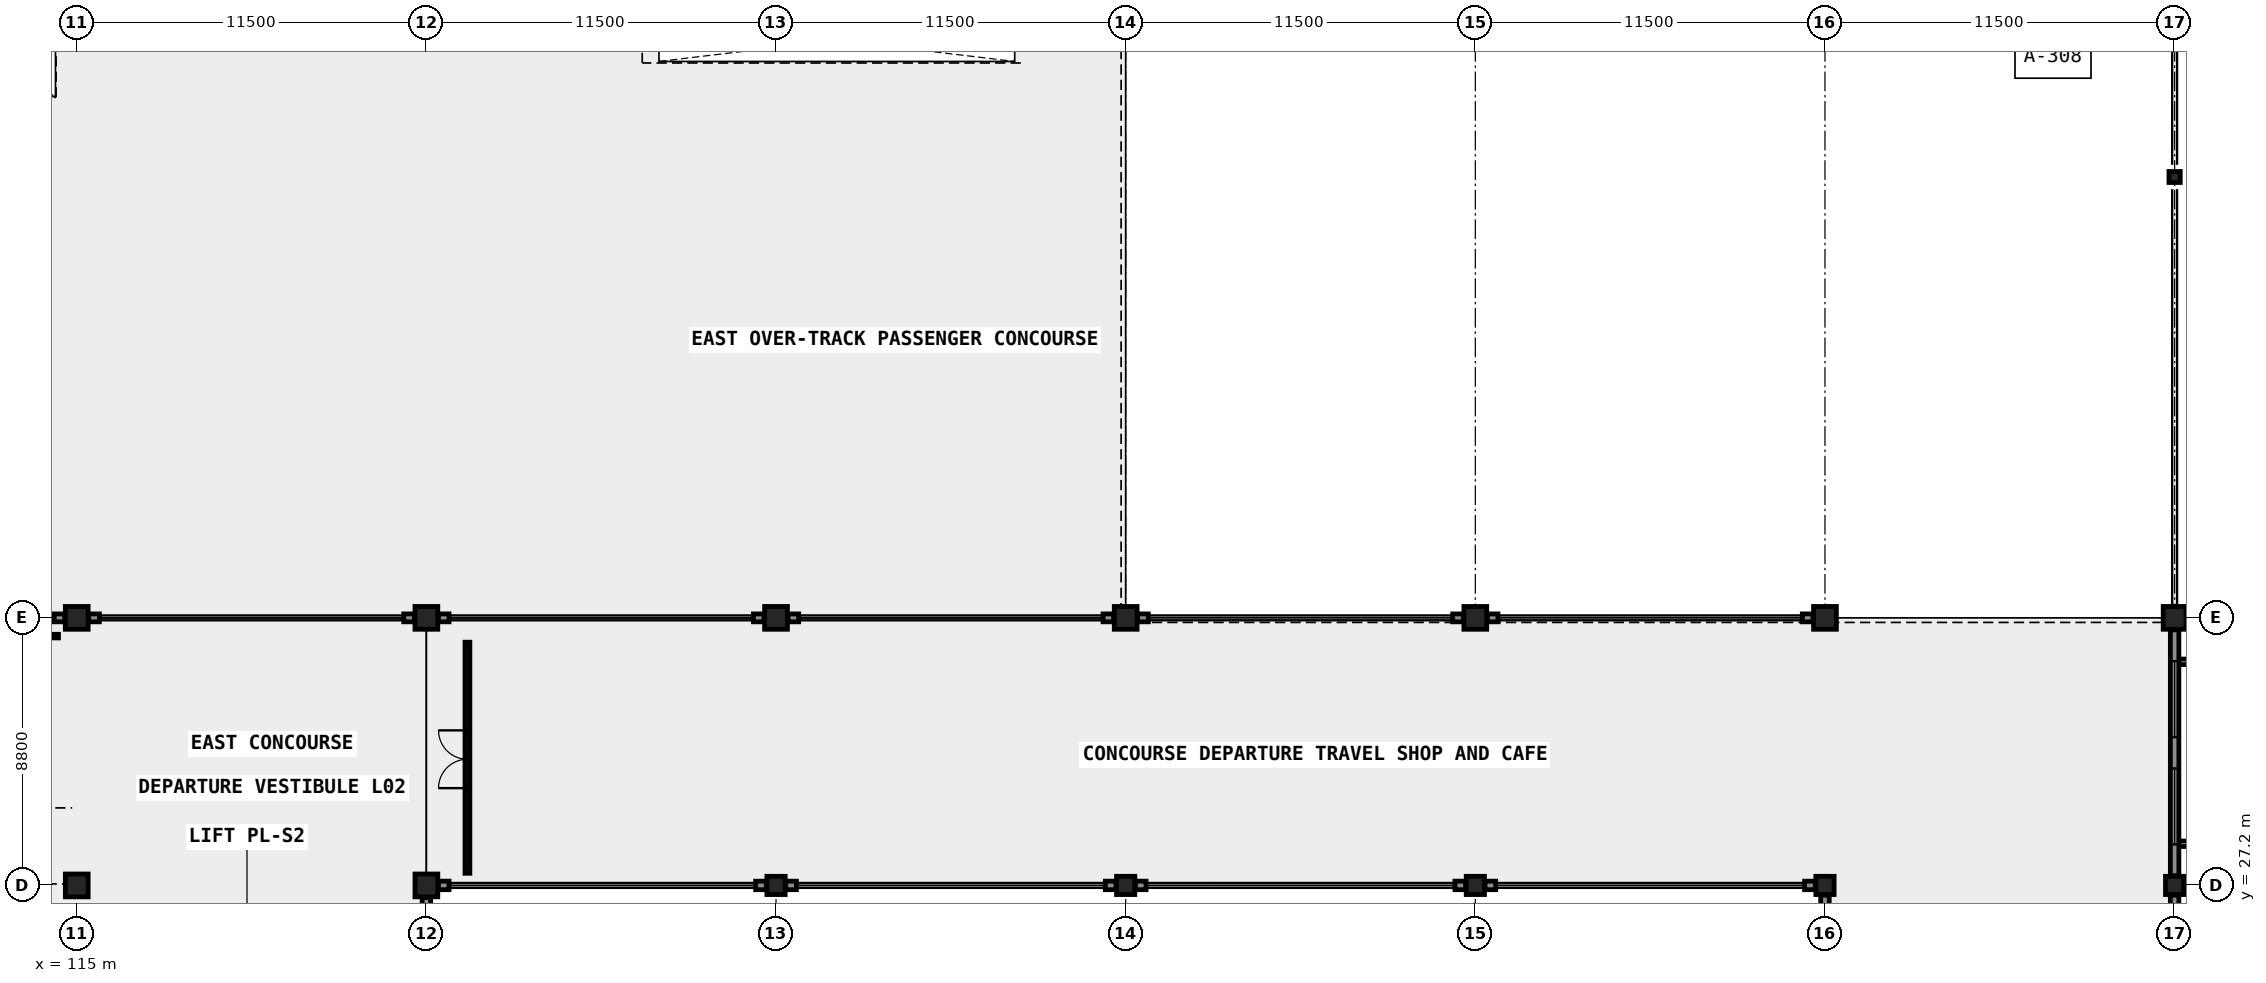
"""IFC4 building model, lengths in metres.
Left out: names, types, materials, properties, quantities, classifications, styles, units other than length and angle.
Written with IfcOpenShell. Run it as: python <this file> out.ifc"""

import sys

from ifc_helpers import new_model, si_unit, direction, frame, frame_2d, origin, origin_2d, place, context, subcontext, project, spatial, rectangle, circle, i_section, extrude, element, fill, save


model = new_model("IFC4")
c1 = context("Model", 3, precision=1e-05, world=origin(), true_north=direction((0.0, 1.0)))
c2 = subcontext(c1, "Body", "Model", "MODEL_VIEW")
j1 = project(units=[si_unit("LENGTHUNIT", "METRE"), si_unit("PLANEANGLEUNIT", "RADIAN")], contexts=[c1])
p1 = place(None, origin())
s1 = spatial("IfcSite", under=j1, at=p1, CompositionType="ELEMENT")
p2 = place(p1, origin())
s2 = spatial("IfcBuilding", under=s1, at=p2, CompositionType="ELEMENT")
p3 = place(p2, frame((0.0, 0.0, 8.4)))
s3 = spatial("IfcBuildingStorey", under=s2, at=p3, CompositionType="ELEMENT", Elevation=8.4)
p4 = place(p3, frame((115.0, 27.2, 0.0), z_axis=(0.0, 0.0, 1.0), x_axis=(1.0, 0.0, 0.0)))
e1 = element("IfcColumn", 1, at=p4, inside=s3, PredefinedType="COLUMN", context=c2, shape_type="SweptSolid", body=[
    extrude(circle(Radius=0.375, at=origin_2d()), origin(), (0.0, 0.0, 1.0), 5.4),
])
p5 = place(p3, frame((115.0, 36.0, 0.0), z_axis=(0.0, 0.0, 1.0), x_axis=(1.0, 0.0, 0.0)))
e2 = element("IfcColumn", 2, at=p5, inside=s3, PredefinedType="COLUMN", context=c2, shape_type="SweptSolid", body=[
    extrude(rectangle(XDim=0.75, YDim=0.75, at=origin_2d()), origin(), (0.0, 0.0, 1.0), 5.4),
])
p6 = place(p3, frame((126.5, 27.2, 0.0), z_axis=(0.0, 0.0, 1.0), x_axis=(1.0, 0.0, 0.0)))
e3 = element("IfcColumn", 3, at=p6, inside=s3, PredefinedType="COLUMN", context=c2, shape_type="SweptSolid", body=[
    extrude(circle(Radius=0.375, at=origin_2d()), origin(), (0.0, 0.0, 1.0), 5.4),
])
p7 = place(p3, frame((126.5, 36.0, 0.0), z_axis=(0.0, 0.0, 1.0), x_axis=(1.0, 0.0, 0.0)))
e4 = element("IfcColumn", 4, at=p7, inside=s3, PredefinedType="COLUMN", context=c2, shape_type="SweptSolid", body=[
    extrude(rectangle(XDim=0.75, YDim=0.75, at=origin_2d()), origin(), (0.0, 0.0, 1.0), 5.4),
])
p8 = place(p3, frame((138.0, 27.2, 0.0), z_axis=(0.0, 0.0, 1.0), x_axis=(1.0, 0.0, 0.0)))
e5 = element("IfcColumn", 5, at=p8, inside=s3, PredefinedType="COLUMN", context=c2, shape_type="SweptSolid", body=[
    extrude(rectangle(XDim=0.6, YDim=0.6, at=origin_2d()), origin(), (0.0, 0.0, 1.0), 5.4),
])
p9 = place(p3, frame((138.0, 36.0, 0.0), z_axis=(0.0, 0.0, 1.0), x_axis=(1.0, 0.0, 0.0)))
e6 = element("IfcColumn", 6, at=p9, inside=s3, PredefinedType="COLUMN", context=c2, shape_type="SweptSolid", body=[
    extrude(rectangle(XDim=0.75, YDim=0.75, at=origin_2d()), origin(), (0.0, 0.0, 1.0), 5.4),
])
p10 = place(p3, frame((149.5, 27.2, 0.0), z_axis=(0.0, 0.0, 1.0), x_axis=(1.0, 0.0, 0.0)))
e7 = element("IfcColumn", 7, at=p10, inside=s3, PredefinedType="COLUMN", context=c2, shape_type="SweptSolid", body=[
    extrude(rectangle(XDim=0.6, YDim=0.6, at=origin_2d()), origin(), (0.0, 0.0, 1.0), 5.4),
])
p11 = place(p3, frame((149.5, 36.0, 0.0), z_axis=(0.0, 0.0, 1.0), x_axis=(1.0, 0.0, 0.0)))
e8 = element("IfcColumn", 8, at=p11, inside=s3, PredefinedType="COLUMN", context=c2, shape_type="SweptSolid", body=[
    extrude(rectangle(XDim=0.75, YDim=0.75, at=origin_2d()), origin(), (0.0, 0.0, 1.0), 5.4),
])
p12 = place(p3, frame((161.0, 27.2, 0.0), z_axis=(0.0, 0.0, 1.0), x_axis=(1.0, 0.0, 0.0)))
e9 = element("IfcColumn", 9, at=p12, inside=s3, PredefinedType="COLUMN", context=c2, shape_type="SweptSolid", body=[
    extrude(rectangle(XDim=0.6, YDim=0.6, at=origin_2d()), origin(), (0.0, 0.0, 1.0), 5.4),
])
p13 = place(p3, frame((161.0, 36.0, 0.0), z_axis=(0.0, 0.0, 1.0), x_axis=(1.0, 0.0, 0.0)))
e10 = element("IfcColumn", 10, at=p13, inside=s3, PredefinedType="COLUMN", context=c2, shape_type="SweptSolid", body=[
    extrude(rectangle(XDim=0.75, YDim=0.75, at=origin_2d()), origin(), (0.0, 0.0, 1.0), 5.4),
])
p14 = place(p3, frame((172.5, 27.2, 0.0), z_axis=(0.0, 0.0, 1.0), x_axis=(1.0, 0.0, 0.0)))
e11 = element("IfcColumn", 11, at=p14, inside=s3, PredefinedType="COLUMN", context=c2, shape_type="SweptSolid", body=[
    extrude(rectangle(XDim=0.6, YDim=0.6, at=origin_2d()), origin(), (0.0, 0.0, 1.0), 5.4),
])
p15 = place(p3, frame((172.5, 36.0, 0.0), z_axis=(0.0, 0.0, 1.0), x_axis=(1.0, 0.0, 0.0)))
e12 = element("IfcColumn", 12, at=p15, inside=s3, PredefinedType="COLUMN", context=c2, shape_type="SweptSolid", body=[
    extrude(rectangle(XDim=0.75, YDim=0.75, at=origin_2d()), origin(), (0.0, 0.0, 1.0), 5.4),
])
p16 = place(p3, frame((184.0, 27.2, 0.0), z_axis=(0.0, 0.0, 1.0), x_axis=(1.0, 0.0, 0.0)))
e13 = element("IfcColumn", 13, at=p16, inside=s3, PredefinedType="COLUMN", context=c2, shape_type="SweptSolid", body=[
    extrude(rectangle(XDim=0.6, YDim=0.6, at=origin_2d()), origin(), (0.0, 0.0, 1.0), 5.4),
])
p17 = place(p3, frame((184.0, 36.0, 0.0), z_axis=(0.0, 0.0, 1.0), x_axis=(1.0, 0.0, 0.0)))
e14 = element("IfcColumn", 14, at=p17, inside=s3, PredefinedType="COLUMN", context=c2, shape_type="SweptSolid", body=[
    extrude(rectangle(XDim=0.75, YDim=0.75, at=origin_2d()), origin(), (0.0, 0.0, 1.0), 5.4),
])
p18 = place(p3, frame((184.0, 50.5, 0.0), z_axis=(0.0, 0.0, 1.0), x_axis=(1.0, 0.0, 0.0)))
e15 = element("IfcColumn", 15, at=p18, inside=s3, PredefinedType="COLUMN", context=c2, shape_type="SweptSolid", body=[
    extrude(i_section(OverallWidth=0.371, OverallDepth=0.362, WebThickness=0.012, FlangeThickness=0.021, at=origin_2d()), origin(), (0.0, 0.0, 1.0), 11.947),
])
p19 = place(p3, frame((126.5, 17.995, 0.0), z_axis=(0.0, 0.0, 1.0), x_axis=(0.0, 1.0, 0.0)))
e16 = element("IfcWall", 16, at=p19, inside=s3, PredefinedType="SOLIDWALL", context=c2, shape_type="SweptSolid", body=[
    extrude(rectangle(XDim=8.81, YDim=0.28, at=frame_2d((4.405, 0.0))), origin(), (0.0, 0.0, 1.0), 4.25),
])
p20 = place(p19, frame((1.27, 0.0, 0.85)))
e17 = element("IfcOpeningElement", 17, at=p20, cuts=e16, PredefinedType="OPENING", context=c2, shape_type="SweptSolid", body=[
    extrude(rectangle(XDim=2.5, YDim=2.2, at=frame_2d((1.25, 1.1))), frame((0.0, 0.15, 0.0), z_axis=(0.0, -1.0, 0.0), x_axis=(1.0, 0.0, 0.0)), (0.0, 0.0, 1.0), 0.3),
])
p21 = place(p19, frame((5.04, 0.0, 0.85)))
e18 = element("IfcOpeningElement", 18, at=p21, cuts=e16, PredefinedType="OPENING", context=c2, shape_type="SweptSolid", body=[
    extrude(rectangle(XDim=2.5, YDim=2.2, at=frame_2d((1.25, 1.1))), frame((0.0, 0.15, 0.0), z_axis=(0.0, -1.0, 0.0), x_axis=(1.0, 0.0, 0.0)), (0.0, 0.0, 1.0), 0.3),
])
p22 = place(p3, frame((126.895, 27.2, 0.0), z_axis=(0.0, 0.0, 1.0), x_axis=(1.0, 0.0, 0.0)))
e19 = element("IfcWall", 19, at=p22, inside=s3, PredefinedType="SOLIDWALL", context=c2, shape_type="SweptSolid", body=[
    extrude(rectangle(XDim=0.35, YDim=0.28, at=frame_2d((0.175, 0.0))), origin(), (0.0, 0.0, 1.0), 5.14),
])
for number, where, z_axis, x_axis in (
    (20, (137.33, 27.2, 0.0), (0.0, 0.0, 1.0), (1.0, 0.0, 0.0)),
    (21, (138.32, 27.2, 0.0), (0.0, 0.0, 1.0), (1.0, 0.0, 0.0)),
    (22, (148.83, 27.2, 0.0), (0.0, 0.0, 1.0), (1.0, 0.0, 0.0)),
    (23, (149.82, 27.2, 0.0), (0.0, 0.0, 1.0), (1.0, 0.0, 0.0)),
    (24, (160.33, 27.2, 0.0), (0.0, 0.0, 1.0), (1.0, 0.0, 0.0)),
    (25, (161.32, 27.2, 0.0), (0.0, 0.0, 1.0), (1.0, 0.0, 0.0)),
    (26, (171.83, 27.2, 0.0), (0.0, 0.0, 1.0), (1.0, 0.0, 0.0)),
):
    element("IfcWall", number, at=place(p3, frame(where, z_axis=z_axis, x_axis=x_axis)), inside=s3, PredefinedType="SOLIDWALL", context=c2, shape_type="SweptSolid", body=[
        extrude(rectangle(XDim=0.35, YDim=0.28, at=frame_2d((0.175, 0.0))), origin(), (0.0, 0.0, 1.0), 5.14),
    ])
p23 = place(p3, frame((172.5, 17.92, 0.0), z_axis=(0.0, 0.0, 1.0), x_axis=(0.0, 1.0, 0.0)))
e27 = element("IfcWall", 27, at=p23, inside=s3, PredefinedType="SOLIDWALL", context=c2, shape_type="SweptSolid", body=[
    extrude(rectangle(XDim=8.96, YDim=0.28, at=frame_2d((4.48, 0.0))), origin(), (0.0, 0.0, 1.0), 4.25),
])
p24 = place(p23, frame((2.287, 0.0, 0.85)))
e28 = element("IfcOpeningElement", 28, at=p24, cuts=e27, PredefinedType="OPENING", context=c2, shape_type="SweptSolid", body=[
    extrude(rectangle(XDim=1.05, YDim=2.05, at=frame_2d((0.525, 1.025))), frame((0.0, 0.15, 0.0), z_axis=(0.0, -1.0, 0.0), x_axis=(1.0, 0.0, 0.0)), (0.0, 0.0, 1.0), 0.3),
])
p25 = place(p23, frame((5.623, 0.0, 0.85)))
e29 = element("IfcOpeningElement", 29, at=p25, cuts=e27, PredefinedType="OPENING", context=c2, shape_type="SweptSolid", body=[
    extrude(rectangle(XDim=1.05, YDim=2.05, at=frame_2d((0.525, 1.025))), frame((0.0, 0.15, 0.0), z_axis=(0.0, -1.0, 0.0), x_axis=(1.0, 0.0, 0.0)), (0.0, 0.0, 1.0), 0.3),
])
p26 = place(p3, frame((184.0, 17.92, 0.0), z_axis=(0.0, 0.0, 1.0), x_axis=(0.0, 1.0, 0.0)))
e30 = element("IfcWall", 30, at=p26, inside=s3, PredefinedType="SOLIDWALL", context=c2, shape_type="SweptSolid", body=[
    extrude(rectangle(XDim=8.96, YDim=0.28, at=frame_2d((4.48, 0.0))), origin(), (0.0, 0.0, 1.0), 4.45),
])
p27 = place(p26, frame((1.32, 0.0, 0.85)))
e31 = element("IfcOpeningElement", 31, at=p27, cuts=e30, PredefinedType="OPENING", context=c2, shape_type="SweptSolid", body=[
    extrude(rectangle(XDim=2.5, YDim=2.2, at=frame_2d((1.25, 1.1))), frame((0.0, 0.15, 0.0), z_axis=(0.0, -1.0, 0.0), x_axis=(1.0, 0.0, 0.0)), (0.0, 0.0, 1.0), 0.3),
])
p28 = place(p26, frame((5.14, 0.0, 0.85)))
e32 = element("IfcOpeningElement", 32, at=p28, cuts=e30, PredefinedType="OPENING", context=c2, shape_type="SweptSolid", body=[
    extrude(rectangle(XDim=2.5, YDim=2.2, at=frame_2d((1.25, 1.1))), frame((0.0, 0.15, 0.0), z_axis=(0.0, -1.0, 0.0), x_axis=(1.0, 0.0, 0.0)), (0.0, 0.0, 1.0), 0.3),
])
p29 = place(p3, frame((184.0, 27.52, 0.0), z_axis=(0.0, 0.0, 1.0), x_axis=(0.0, 1.0, 0.0)))
e33 = element("IfcWall", 33, at=p29, inside=s3, PredefinedType="SOLIDWALL", context=c2, shape_type="SweptSolid", body=[
    extrude(rectangle(XDim=8.085, YDim=0.28, at=frame_2d((4.042, 0.0))), origin(), (0.0, 0.0, 1.0), 4.45),
])
p30 = place(p29, frame((1.028, 0.0, 0.85)))
e34 = element("IfcOpeningElement", 34, at=p30, cuts=e33, PredefinedType="OPENING", context=c2, shape_type="SweptSolid", body=[
    extrude(rectangle(XDim=2.5, YDim=2.2, at=frame_2d((1.25, 1.1))), frame((0.0, 0.15, 0.0), z_axis=(0.0, -1.0, 0.0), x_axis=(1.0, 0.0, 0.0)), (0.0, 0.0, 1.0), 0.3),
])
p31 = place(p29, frame((4.557, 0.0, 0.85)))
e35 = element("IfcOpeningElement", 35, at=p31, cuts=e33, PredefinedType="OPENING", context=c2, shape_type="SweptSolid", body=[
    extrude(rectangle(XDim=2.5, YDim=2.2, at=frame_2d((1.25, 1.1))), frame((0.0, 0.15, 0.0), z_axis=(0.0, -1.0, 0.0), x_axis=(1.0, 0.0, 0.0)), (0.0, 0.0, 1.0), 0.3),
])
for number, where, z_axis, x_axis in (
    (36, (114.255, 36.0, 0.0), (0.0, 0.0, 1.0), (1.0, 0.0, 0.0)),
    (37, (115.395, 36.0, 0.0), (0.0, 0.0, 1.0), (1.0, 0.0, 0.0)),
    (38, (125.755, 36.0, 0.0), (0.0, 0.0, 1.0), (1.0, 0.0, 0.0)),
    (39, (126.895, 36.0, 0.0), (0.0, 0.0, 1.0), (1.0, 0.0, 0.0)),
    (40, (137.255, 36.0, 0.0), (0.0, 0.0, 1.0), (1.0, 0.0, 0.0)),
    (41, (138.395, 36.0, 0.0), (0.0, 0.0, 1.0), (1.0, 0.0, 0.0)),
    (42, (148.755, 36.0, 0.0), (0.0, 0.0, 1.0), (1.0, 0.0, 0.0)),
    (43, (149.895, 36.0, 0.0), (0.0, 0.0, 1.0), (1.0, 0.0, 0.0)),
    (44, (160.255, 36.0, 0.0), (0.0, 0.0, 1.0), (1.0, 0.0, 0.0)),
    (45, (161.395, 36.0, 0.0), (0.0, 0.0, 1.0), (1.0, 0.0, 0.0)),
    (46, (171.755, 36.0, 0.0), (0.0, 0.0, 1.0), (1.0, 0.0, 0.0)),
):
    element("IfcWall", number, at=place(p3, frame(where, z_axis=z_axis, x_axis=x_axis)), inside=s3, PredefinedType="SOLIDWALL", context=c2, shape_type="SweptSolid", body=[
        extrude(rectangle(XDim=0.35, YDim=0.26, at=frame_2d((0.175, 0.0))), origin(), (0.0, 0.0, 1.0), 5.1),
    ])
p32 = place(p3, frame((69.6, 35.4, 0.0), z_axis=(0.0, 0.0, 1.0), x_axis=(1.0, 0.0, 0.0)))
e47 = element("IfcWall", 47, at=p32, inside=s3, PredefinedType="MOVABLE", context=c2, shape_type="SweptSolid", body=[
    extrude(rectangle(XDim=44.8, YDim=0.12, at=frame_2d((22.4, 0.0))), origin(), (0.0, 0.0, 1.0), 5.12),
])
p33 = place(p32, frame((14.5, 0.0, 0.0)))
e48 = element("IfcOpeningElement", 48, at=p33, cuts=e47, PredefinedType="OPENING", context=c2, shape_type="SweptSolid", body=[
    extrude(rectangle(XDim=2.1, YDim=2.35, at=frame_2d((1.05, 1.175))), frame((0.0, 0.07, 0.0), z_axis=(0.0, -1.0, 0.0), x_axis=(1.0, 0.0, 0.0)), (0.0, 0.0, 1.0), 0.14),
])
p34 = place(p3, frame((127.85, 27.6, 0.0), z_axis=(0.0, 0.0, 1.0), x_axis=(0.0, 1.0, 0.0)))
e49 = element("IfcWall", 49, at=p34, inside=s3, PredefinedType="PARTITIONING", context=c2, shape_type="SweptSolid", body=[
    extrude(rectangle(XDim=7.6, YDim=0.16, at=frame_2d((3.8, 0.0))), origin(), (0.0, 0.0, 1.0), 4.98),
])
p35 = place(p34, frame((2.8, 0.0, 0.0)))
e50 = element("IfcOpeningElement", 50, at=p35, cuts=e49, PredefinedType="OPENING", context=c2, shape_type="SweptSolid", body=[
    extrude(rectangle(XDim=1.9, YDim=2.35, at=frame_2d((0.95, 1.175))), frame((0.0, 0.09, 0.0), z_axis=(0.0, -1.0, 0.0), x_axis=(1.0, 0.0, 0.0)), (0.0, 0.0, 1.0), 0.18),
])
p36 = place(p30, origin())
e51 = element("IfcWindow", 51, at=p36, inside=s3, PartitioningType="SINGLE_PANEL", PredefinedType="WINDOW", context=c2, shape_type="SweptSolid", body=[
    extrude(rectangle(XDim=2.5, YDim=2.2, at=frame_2d((1.25, 1.1))), frame((0.0, 0.03, 0.0), z_axis=(0.0, -1.0, 0.0), x_axis=(1.0, 0.0, 0.0)), (0.0, 0.0, 1.0), 0.06),
])
fill(e34, e51)
p37 = place(p31, origin())
e52 = element("IfcWindow", 52, at=p37, inside=s3, PartitioningType="SINGLE_PANEL", PredefinedType="WINDOW", context=c2, shape_type="SweptSolid", body=[
    extrude(rectangle(XDim=2.5, YDim=2.2, at=frame_2d((1.25, 1.1))), frame((0.0, 0.03, 0.0), z_axis=(0.0, -1.0, 0.0), x_axis=(1.0, 0.0, 0.0)), (0.0, 0.0, 1.0), 0.06),
])
fill(e35, e52)
p38 = place(p35, origin())
e53 = element("IfcDoor", 53, at=p38, inside=s3, OperationType="DOUBLE_DOOR_SINGLE_SWING", PredefinedType="DOOR", context=c2, shape_type="SweptSolid", body=[
    extrude(rectangle(XDim=1.9, YDim=2.35, at=frame_2d((0.95, 1.175))), frame((0.0, 0.025, 0.0), z_axis=(0.0, -1.0, 0.0), x_axis=(1.0, 0.0, 0.0)), (0.0, 0.0, 1.0), 0.05),
])
fill(e50, e53)
save(model, sys.argv[1])
